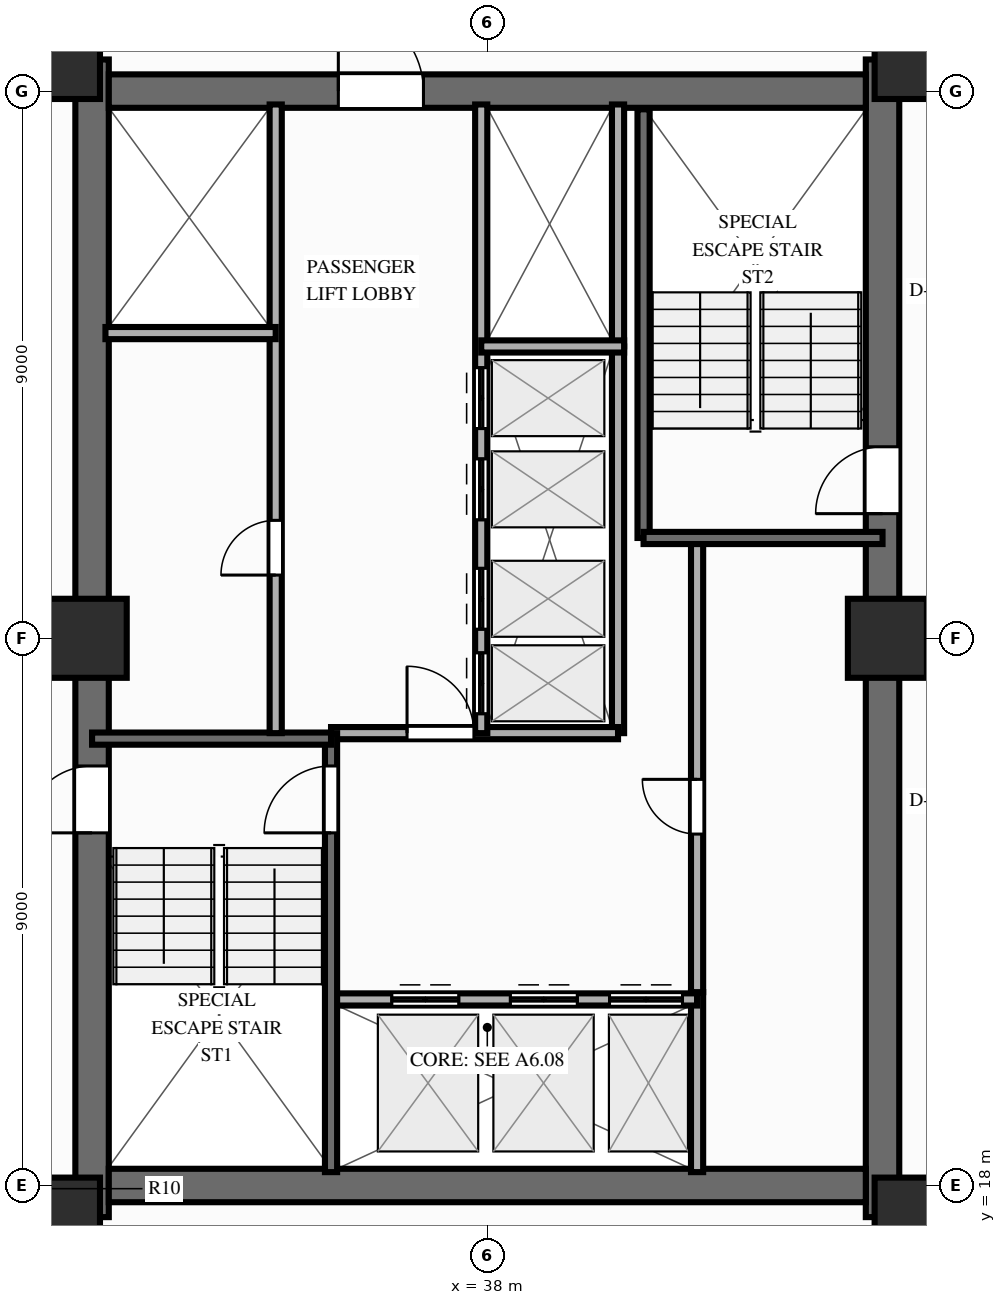
"""IFC4 building model, lengths in metres.
Left out: names, types, materials, properties, quantities, classifications, styles, units other than length and angle.
Written with IfcOpenShell. Run it as: python <this file> out.ifc"""

import sys

from ifc_helpers import new_model, si_unit, direction, frame, frame_2d, origin, origin_2d, place, context, subcontext, project, spatial, rectangle, extrude, source, transform, mapped, element, fill, save


model = new_model("IFC4")
c1 = context("Model", 3, precision=1e-05, world=origin(), true_north=direction((0.0, 1.0)))
c2 = subcontext(c1, "Body", "Model", "MODEL_VIEW")
j1 = project(units=[si_unit("LENGTHUNIT", "METRE"), si_unit("PLANEANGLEUNIT", "RADIAN")], contexts=[c1])
p1 = place(None, origin())
s1 = spatial("IfcSite", under=j1, at=p1, CompositionType="ELEMENT")
p2 = place(p1, origin())
s2 = spatial("IfcBuilding", under=s1, at=p2, CompositionType="ELEMENT")
p3 = place(p2, frame((0.0, 0.0, 119.85)))
s3 = spatial("IfcBuildingStorey", under=s2, at=p3, CompositionType="ELEMENT", Elevation=119.85)
p4 = place(p3, frame((31.5, 17.48, 0.0), z_axis=(0.0, 0.0, 1.0), x_axis=(0.0, 1.0, 0.0)))
e1 = element("IfcWall", 1, at=p4, inside=s3, PredefinedType="SHEAR", context=c2, shape_type="SweptSolid", body=[
    extrude(rectangle(XDim=19.04, YDim=0.55, at=frame_2d((9.52, 0.0))), origin(), (0.0, 0.0, 1.0), 3.0),
])
p5 = place(p4, frame((6.32, 0.0, 0.0)))
e2 = element("IfcOpeningElement", 2, at=p5, cuts=e1, PredefinedType="OPENING", context=c2, shape_type="SweptSolid", body=[
    extrude(rectangle(XDim=1.1, YDim=2.15, at=frame_2d((0.55, 1.075))), frame((0.0, 0.287, 0.0), z_axis=(0.0, -1.0, 0.0), x_axis=(1.0, 0.0, 0.0)), (0.0, 0.0, 1.0), 0.574),
])
p6 = place(p3, frame((44.5, 17.48, 0.0), z_axis=(0.0, 0.0, 1.0), x_axis=(0.0, 1.0, 0.0)))
e3 = element("IfcWall", 3, at=p6, inside=s3, PredefinedType="SHEAR", context=c2, shape_type="SweptSolid", body=[
    extrude(rectangle(XDim=19.04, YDim=0.55, at=frame_2d((9.52, 0.0))), origin(), (0.0, 0.0, 1.0), 3.0),
])
p7 = place(p6, frame((12.67, 0.0, 0.0), z_axis=(0.0, 0.0, 1.0), x_axis=(-1.0, 0.0, 0.0)))
e4 = element("IfcOpeningElement", 4, at=p7, cuts=e3, PredefinedType="OPENING", context=c2, shape_type="SweptSolid", body=[
    extrude(rectangle(XDim=1.1, YDim=2.15, at=frame_2d((0.55, 1.075))), frame((0.0, 0.287, 0.0), z_axis=(0.0, -1.0, 0.0), x_axis=(1.0, 0.0, 0.0)), (0.0, 0.0, 1.0), 0.574),
])
p8 = place(p3, frame((31.775, 18.0, 0.0), z_axis=(0.0, 0.0, 1.0), x_axis=(1.0, 0.0, 0.0)))
e5 = element("IfcWall", 5, at=p8, inside=s3, PredefinedType="SHEAR", context=c2, shape_type="SweptSolid", body=[
    extrude(rectangle(XDim=12.45, YDim=0.55, at=frame_2d((6.225, 0.0))), origin(), (0.0, 0.0, 1.0), 3.0),
])
p9 = place(p3, frame((31.775, 36.0, 0.0), z_axis=(0.0, 0.0, 1.0), x_axis=(1.0, 0.0, 0.0)))
e6 = element("IfcWall", 6, at=p9, inside=s3, PredefinedType="SHEAR", context=c2, shape_type="SweptSolid", body=[
    extrude(rectangle(XDim=12.45, YDim=0.55, at=frame_2d((6.225, 0.0))), origin(), (0.0, 0.0, 1.0), 3.0),
])
p10 = place(p9, frame((5.175, 0.0, 0.0), z_axis=(0.0, 0.0, 1.0), x_axis=(-1.0, 0.0, 0.0)))
e7 = element("IfcOpeningElement", 7, at=p10, cuts=e6, PredefinedType="OPENING", context=c2, shape_type="SweptSolid", body=[
    extrude(rectangle(XDim=1.4, YDim=2.15, at=frame_2d((0.7, 1.075))), frame((0.0, 0.287, 0.0), z_axis=(0.0, -1.0, 0.0), x_axis=(1.0, 0.0, 0.0)), (0.0, 0.0, 1.0), 0.574),
])
m1 = source(origin(), c2, "Body", "SweptSolid", [
    extrude(rectangle(XDim=1.3, YDim=1.3, at=origin_2d()), origin(), (0.0, 0.0, 1.0), 3.0),
])
for number, where, z_axis, x_axis in (
    (8, (30.98, 17.48, 0.0), (0.0, 0.0, 1.0), (1.0, 0.0, 0.0)),
    (9, (45.02, 17.48, 0.0), (0.0, 0.0, 1.0), (1.0, 0.0, 0.0)),
    (10, (30.98, 36.52, 0.0), (0.0, 0.0, 1.0), (1.0, 0.0, 0.0)),
    (11, (45.02, 36.52, 0.0), (0.0, 0.0, 1.0), (1.0, 0.0, 0.0)),
    (12, (31.42, 27.0, 0.0), (0.0, 0.0, 1.0), (1.0, 0.0, 0.0)),
    (13, (44.58, 27.0, 0.0), (0.0, 0.0, 1.0), (1.0, 0.0, 0.0)),
):
    element("IfcColumn", number, at=place(p3, frame(where, z_axis=z_axis, x_axis=x_axis)), inside=s3, PredefinedType="COLUMN", context=c2, shape_type="MappedRepresentation", body=[
        mapped(m1, transform((0.0, 0.0, 0.0), scale=1.0)),
    ])
p11 = place(p3, frame((41.45, 18.22, 0.0), z_axis=(0.0, 0.0, 1.0), x_axis=(0.0, 1.0, 0.0)))
e14 = element("IfcWall", 14, at=p11, inside=s3, PredefinedType="PARTITIONING", context=c2, shape_type="SweptSolid", body=[
    extrude(rectangle(XDim=2.96, YDim=0.2, at=frame_2d((1.48, 0.0))), origin(), (0.0, 0.0, 1.0), 2.79),
])
p12 = place(p3, frame((41.45, 21.18, 0.0), z_axis=(0.0, 0.0, 1.0), x_axis=(0.0, 1.0, 0.0)))
e15 = element("IfcWall", 15, at=p12, inside=s3, PredefinedType="PARTITIONING", context=c2, shape_type="SweptSolid", body=[
    extrude(rectangle(XDim=7.42, YDim=0.2, at=frame_2d((3.71, 0.0))), origin(), (0.0, 0.0, 1.0), 2.79),
])
p13 = place(p12, frame((2.6, 0.0, 0.0)))
e16 = element("IfcOpeningElement", 16, at=p13, cuts=e15, PredefinedType="OPENING", context=c2, shape_type="SweptSolid", body=[
    extrude(rectangle(XDim=0.9, YDim=2.1, at=frame_2d((0.45, 1.05))), frame((0.0, 0.112, 0.0), z_axis=(0.0, -1.0, 0.0), x_axis=(1.0, 0.0, 0.0)), (0.0, 0.0, 1.0), 0.224),
])
p14 = place(p3, frame((40.15, 25.44, 0.0), z_axis=(0.0, 0.0, 1.0), x_axis=(0.0, 1.0, 0.0)))
e17 = element("IfcWall", 17, at=p14, inside=s3, PredefinedType="PARTITIONING", context=c2, shape_type="SweptSolid", body=[
    extrude(rectangle(XDim=6.36, YDim=0.2, at=frame_2d((3.18, 0.0))), origin(), (0.0, 0.0, 1.0), 2.79),
])
p15 = place(p3, frame((40.15, 31.8, 0.0), z_axis=(0.0, 0.0, 1.0), x_axis=(0.0, 1.0, 0.0)))
e18 = element("IfcWall", 18, at=p15, inside=s3, PredefinedType="PARTITIONING", context=c2, shape_type="SweptSolid", body=[
    extrude(rectangle(XDim=3.98, YDim=0.2, at=frame_2d((1.99, 0.0))), origin(), (0.0, 0.0, 1.0), 2.79),
])
p16 = place(p3, frame((35.43, 21.06, 0.0), z_axis=(0.0, 0.0, 1.0), x_axis=(1.0, 0.0, 0.0)))
e19 = element("IfcWall", 19, at=p16, inside=s3, PredefinedType="PARTITIONING", context=c2, shape_type="SweptSolid", body=[
    extrude(rectangle(XDim=6.02, YDim=0.2, at=frame_2d((3.01, 0.0))), origin(), (0.0, 0.0, 1.0), 2.79),
])
p17 = place(p16, frame((1.0, 0.0, 0.0)))
e20 = element("IfcOpeningElement", 20, at=p17, cuts=e19, PredefinedType="OPENING", context=c2, shape_type="SweptSolid", body=[
    extrude(rectangle(XDim=1.1, YDim=2.15, at=frame_2d((0.55, 1.075))), frame((0.0, 0.112, 0.0), z_axis=(0.0, -1.0, 0.0), x_axis=(1.0, 0.0, 0.0)), (0.0, 0.0, 1.0), 0.224),
])
p18 = place(p16, frame((2.95, 0.0, 0.0)))
e21 = element("IfcOpeningElement", 21, at=p18, cuts=e19, PredefinedType="OPENING", context=c2, shape_type="SweptSolid", body=[
    extrude(rectangle(XDim=1.1, YDim=2.15, at=frame_2d((0.55, 1.075))), frame((0.0, 0.112, 0.0), z_axis=(0.0, -1.0, 0.0), x_axis=(1.0, 0.0, 0.0)), (0.0, 0.0, 1.0), 0.224),
])
p19 = place(p16, frame((4.58, 0.0, 0.0)))
e22 = element("IfcOpeningElement", 22, at=p19, cuts=e19, PredefinedType="OPENING", context=c2, shape_type="SweptSolid", body=[
    extrude(rectangle(XDim=1.2, YDim=2.15, at=frame_2d((0.6, 1.075))), frame((0.0, 0.112, 0.0), z_axis=(0.0, -1.0, 0.0), x_axis=(1.0, 0.0, 0.0)), (0.0, 0.0, 1.0), 0.224),
])
p20 = place(p3, frame((35.43, 25.44, 0.0), z_axis=(0.0, 0.0, 1.0), x_axis=(1.0, 0.0, 0.0)))
e23 = element("IfcWall", 23, at=p20, inside=s3, PredefinedType="PARTITIONING", context=c2, shape_type="SweptSolid", body=[
    extrude(rectangle(XDim=4.72, YDim=0.2, at=frame_2d((2.36, 0.0))), origin(), (0.0, 0.0, 1.0), 2.79),
])
p21 = place(p20, frame((1.25, 0.0, 0.0)))
e24 = element("IfcOpeningElement", 24, at=p21, cuts=e23, PredefinedType="OPENING", context=c2, shape_type="SweptSolid", body=[
    extrude(rectangle(XDim=1.1, YDim=2.15, at=frame_2d((0.55, 1.075))), frame((0.0, 0.112, 0.0), z_axis=(0.0, -1.0, 0.0), x_axis=(1.0, 0.0, 0.0)), (0.0, 0.0, 1.0), 0.224),
])
p22 = place(p3, frame((35.43, 18.22, 0.0), z_axis=(0.0, 0.0, 1.0), x_axis=(0.0, 1.0, 0.0)))
e25 = element("IfcWall", 25, at=p22, inside=s3, PredefinedType="SOLIDWALL", context=c2, shape_type="SweptSolid", body=[
    extrude(rectangle(XDim=7.22, YDim=0.2, at=frame_2d((3.61, 0.0))), origin(), (0.0, 0.0, 1.0), 2.79),
])
p23 = place(p22, frame((6.68, 0.0, 0.0), z_axis=(0.0, 0.0, 1.0), x_axis=(-1.0, 0.0, 0.0)))
e26 = element("IfcOpeningElement", 26, at=p23, cuts=e25, PredefinedType="OPENING", context=c2, shape_type="SweptSolid", body=[
    extrude(rectangle(XDim=1.1, YDim=2.15, at=frame_2d((0.55, 1.075))), frame((0.0, 0.112, 0.0), z_axis=(0.0, -1.0, 0.0), x_axis=(1.0, 0.0, 0.0)), (0.0, 0.0, 1.0), 0.224),
])
p24 = place(p3, frame((31.5, 25.35, 0.0), z_axis=(0.0, 0.0, 1.0), x_axis=(1.0, 0.0, 0.0)))
e27 = element("IfcWall", 27, at=p24, inside=s3, PredefinedType="SOLIDWALL", context=c2, shape_type="SweptSolid", body=[
    extrude(rectangle(XDim=3.93, YDim=0.2, at=frame_2d((1.965, 0.0))), origin(), (0.0, 0.0, 1.0), 2.79),
])
p25 = place(p3, frame((40.57, 28.65, 0.0), z_axis=(0.0, 0.0, 1.0), x_axis=(0.0, 1.0, 0.0)))
e28 = element("IfcWall", 28, at=p25, inside=s3, PredefinedType="SOLIDWALL", context=c2, shape_type="SweptSolid", body=[
    extrude(rectangle(XDim=7.05, YDim=0.2, at=frame_2d((3.525, 0.0))), origin(), (0.0, 0.0, 1.0), 2.79),
])
p26 = place(p3, frame((40.57, 28.65, 0.0), z_axis=(0.0, 0.0, 1.0), x_axis=(1.0, 0.0, 0.0)))
e29 = element("IfcWall", 29, at=p26, inside=s3, PredefinedType="SOLIDWALL", context=c2, shape_type="SweptSolid", body=[
    extrude(rectangle(XDim=3.93, YDim=0.2, at=frame_2d((1.965, 0.0))), origin(), (0.0, 0.0, 1.0), 2.79),
])
p27 = place(p3, frame((34.52, 25.44, 0.0), z_axis=(0.0, 0.0, 1.0), x_axis=(0.0, 1.0, 0.0)))
e30 = element("IfcWall", 30, at=p27, inside=s3, PredefinedType="PARTITIONING", context=c2, shape_type="SweptSolid", body=[
    extrude(rectangle(XDim=10.34, YDim=0.2, at=frame_2d((5.17, 0.0))), origin(), (0.0, 0.0, 1.0), 2.79),
])
p28 = place(p27, frame((2.6, 0.0, 0.0)))
e31 = element("IfcOpeningElement", 31, at=p28, cuts=e30, PredefinedType="OPENING", context=c2, shape_type="SweptSolid", body=[
    extrude(rectangle(XDim=0.9, YDim=2.1, at=frame_2d((0.45, 1.05))), frame((0.0, 0.112, 0.0), z_axis=(0.0, -1.0, 0.0), x_axis=(1.0, 0.0, 0.0)), (0.0, 0.0, 1.0), 0.224),
])
p29 = place(p3, frame((31.72, 32.02, 0.0), z_axis=(0.0, 0.0, 1.0), x_axis=(1.0, 0.0, 0.0)))
e32 = element("IfcWall", 32, at=p29, inside=s3, PredefinedType="PARTITIONING", context=c2, shape_type="SweptSolid", body=[
    extrude(rectangle(XDim=2.8, YDim=0.2, at=frame_2d((1.4, 0.0))), origin(), (0.0, 0.0, 1.0), 2.79),
])
p30 = place(p3, frame((37.9, 25.44, 0.0), z_axis=(0.0, 0.0, 1.0), x_axis=(0.0, 1.0, 0.0)))
e33 = element("IfcWall", 33, at=p30, inside=s3, PredefinedType="PARTITIONING", context=c2, shape_type="SweptSolid", body=[
    extrude(rectangle(XDim=10.34, YDim=0.2, at=frame_2d((5.17, 0.0))), origin(), (0.0, 0.0, 1.0), 2.79),
])
p31 = place(p30, frame((0.32, 0.0, 0.0)))
e34 = element("IfcOpeningElement", 34, at=p31, cuts=e33, PredefinedType="OPENING", context=c2, shape_type="SweptSolid", body=[
    extrude(rectangle(XDim=1.0, YDim=2.15, at=frame_2d((0.5, 1.075))), frame((0.0, 0.112, 0.0), z_axis=(0.0, -1.0, 0.0), x_axis=(1.0, 0.0, 0.0)), (0.0, 0.0, 1.0), 0.224),
])
p32 = place(p30, frame((1.71, 0.0, 0.0)))
e35 = element("IfcOpeningElement", 35, at=p32, cuts=e33, PredefinedType="OPENING", context=c2, shape_type="SweptSolid", body=[
    extrude(rectangle(XDim=1.0, YDim=2.15, at=frame_2d((0.5, 1.075))), frame((0.0, 0.112, 0.0), z_axis=(0.0, -1.0, 0.0), x_axis=(1.0, 0.0, 0.0)), (0.0, 0.0, 1.0), 0.224),
])
p33 = place(p30, frame((3.51, 0.0, 0.0)))
e36 = element("IfcOpeningElement", 36, at=p33, cuts=e33, PredefinedType="OPENING", context=c2, shape_type="SweptSolid", body=[
    extrude(rectangle(XDim=1.0, YDim=2.15, at=frame_2d((0.5, 1.075))), frame((0.0, 0.112, 0.0), z_axis=(0.0, -1.0, 0.0), x_axis=(1.0, 0.0, 0.0)), (0.0, 0.0, 1.0), 0.224),
])
p34 = place(p30, frame((5.01, 0.0, 0.0)))
e37 = element("IfcOpeningElement", 37, at=p34, cuts=e33, PredefinedType="OPENING", context=c2, shape_type="SweptSolid", body=[
    extrude(rectangle(XDim=1.0, YDim=2.15, at=frame_2d((0.5, 1.075))), frame((0.0, 0.112, 0.0), z_axis=(0.0, -1.0, 0.0), x_axis=(1.0, 0.0, 0.0)), (0.0, 0.0, 1.0), 0.224),
])
p35 = place(p3, frame((37.9, 31.8, 0.0), z_axis=(0.0, 0.0, 1.0), x_axis=(1.0, 0.0, 0.0)))
e38 = element("IfcWall", 38, at=p35, inside=s3, PredefinedType="PARTITIONING", context=c2, shape_type="SweptSolid", body=[
    extrude(rectangle(XDim=2.35, YDim=0.2, at=frame_2d((1.175, 0.0))), origin(), (0.0, 0.0, 1.0), 2.79),
])
m2 = source(origin(), c2, "Body", "SweptSolid", [
    extrude(rectangle(XDim=1.1, YDim=2.15, at=frame_2d((0.55, 1.075))), frame((0.0, 0.025, 0.0), z_axis=(0.0, -1.0, 0.0), x_axis=(1.0, 0.0, 0.0)), (0.0, 0.0, 1.0), 0.05),
])
p36 = place(p5, origin())
e39 = element("IfcDoor", 39, at=p36, inside=s3, OperationType="SINGLE_SWING_LEFT", PredefinedType="DOOR", context=c2, shape_type="MappedRepresentation", body=[
    mapped(m2, transform((0.0, 0.0, 0.0), scale=1.0)),
])
fill(e2, e39)
p37 = place(p7, origin())
e40 = element("IfcDoor", 40, at=p37, inside=s3, OperationType="SINGLE_SWING_RIGHT", PredefinedType="DOOR", context=c2, shape_type="MappedRepresentation", body=[
    mapped(m2, transform((0.0, 0.0, 0.0), scale=1.0)),
])
fill(e4, e40)
m3 = source(origin(), c2, "Body", "SweptSolid", [
    extrude(rectangle(XDim=1.4, YDim=2.15, at=frame_2d((0.7, 1.075))), frame((0.0, 0.025, 0.0), z_axis=(0.0, -1.0, 0.0), x_axis=(1.0, 0.0, 0.0)), (0.0, 0.0, 1.0), 0.05),
])
p38 = place(p10, origin())
e41 = element("IfcDoor", 41, at=p38, inside=s3, OperationType="SINGLE_SWING_RIGHT", PredefinedType="DOOR", context=c2, shape_type="MappedRepresentation", body=[
    mapped(m3, transform((0.0, 0.0, 0.0), scale=1.0)),
])
fill(e7, e41)
m4 = source(origin(), c2, "Body", "SweptSolid", [
    extrude(rectangle(XDim=0.9, YDim=2.1, at=frame_2d((0.45, 1.05))), frame((0.0, 0.025, 0.0), z_axis=(0.0, -1.0, 0.0), x_axis=(1.0, 0.0, 0.0)), (0.0, 0.0, 1.0), 0.05),
])
p39 = place(p13, origin())
e42 = element("IfcDoor", 42, at=p39, inside=s3, OperationType="SINGLE_SWING_RIGHT", PredefinedType="DOOR", context=c2, shape_type="MappedRepresentation", body=[
    mapped(m4, transform((0.0, 0.0, 0.0), scale=1.0)),
])
fill(e16, e42)
p40 = place(p17, origin())
e43 = element("IfcDoor", 43, at=p40, inside=s3, OperationType="DOUBLE_DOOR_SLIDING", PredefinedType="DOOR", context=c2, shape_type="MappedRepresentation", body=[
    mapped(m2, transform((0.0, 0.0, 0.0), scale=1.0)),
])
fill(e20, e43)
p41 = place(p18, origin())
e44 = element("IfcDoor", 44, at=p41, inside=s3, OperationType="DOUBLE_DOOR_SLIDING", PredefinedType="DOOR", context=c2, shape_type="MappedRepresentation", body=[
    mapped(m2, transform((0.0, 0.0, 0.0), scale=1.0)),
])
fill(e21, e44)
m5 = source(origin(), c2, "Body", "SweptSolid", [
    extrude(rectangle(XDim=1.2, YDim=2.15, at=frame_2d((0.6, 1.075))), frame((0.0, 0.025, 0.0), z_axis=(0.0, -1.0, 0.0), x_axis=(1.0, 0.0, 0.0)), (0.0, 0.0, 1.0), 0.05),
])
p42 = place(p19, origin())
e45 = element("IfcDoor", 45, at=p42, inside=s3, OperationType="DOUBLE_DOOR_SLIDING", PredefinedType="DOOR", context=c2, shape_type="MappedRepresentation", body=[
    mapped(m5, transform((0.0, 0.0, 0.0), scale=1.0)),
])
fill(e22, e45)
p43 = place(p21, origin())
e46 = element("IfcDoor", 46, at=p43, inside=s3, OperationType="SINGLE_SWING_LEFT", PredefinedType="DOOR", context=c2, shape_type="MappedRepresentation", body=[
    mapped(m2, transform((0.0, 0.0, 0.0), scale=1.0)),
])
fill(e24, e46)
p44 = place(p23, origin())
e47 = element("IfcDoor", 47, at=p44, inside=s3, OperationType="SINGLE_SWING_RIGHT", PredefinedType="DOOR", context=c2, shape_type="MappedRepresentation", body=[
    mapped(m2, transform((0.0, 0.0, 0.0), scale=1.0)),
])
fill(e26, e47)
p45 = place(p28, origin())
e48 = element("IfcDoor", 48, at=p45, inside=s3, OperationType="SINGLE_SWING_LEFT", PredefinedType="DOOR", context=c2, shape_type="MappedRepresentation", body=[
    mapped(m4, transform((0.0, 0.0, 0.0), scale=1.0)),
])
fill(e31, e48)
m6 = source(origin(), c2, "Body", "SweptSolid", [
    extrude(rectangle(XDim=1.0, YDim=2.15, at=frame_2d((0.5, 1.075))), frame((0.0, 0.025, 0.0), z_axis=(0.0, -1.0, 0.0), x_axis=(1.0, 0.0, 0.0)), (0.0, 0.0, 1.0), 0.05),
])
p46 = place(p31, origin())
e49 = element("IfcDoor", 49, at=p46, inside=s3, OperationType="DOUBLE_DOOR_SLIDING", PredefinedType="DOOR", context=c2, shape_type="MappedRepresentation", body=[
    mapped(m6, transform((0.0, 0.0, 0.0), scale=1.0)),
])
fill(e34, e49)
p47 = place(p32, origin())
e50 = element("IfcDoor", 50, at=p47, inside=s3, OperationType="DOUBLE_DOOR_SLIDING", PredefinedType="DOOR", context=c2, shape_type="MappedRepresentation", body=[
    mapped(m6, transform((0.0, 0.0, 0.0), scale=1.0)),
])
fill(e35, e50)
p48 = place(p33, origin())
e51 = element("IfcDoor", 51, at=p48, inside=s3, OperationType="DOUBLE_DOOR_SLIDING", PredefinedType="DOOR", context=c2, shape_type="MappedRepresentation", body=[
    mapped(m6, transform((0.0, 0.0, 0.0), scale=1.0)),
])
fill(e36, e51)
p49 = place(p34, origin())
e52 = element("IfcDoor", 52, at=p49, inside=s3, OperationType="DOUBLE_DOOR_SLIDING", PredefinedType="DOOR", context=c2, shape_type="MappedRepresentation", body=[
    mapped(m6, transform((0.0, 0.0, 0.0), scale=1.0)),
])
fill(e37, e52)
save(model, sys.argv[1])
